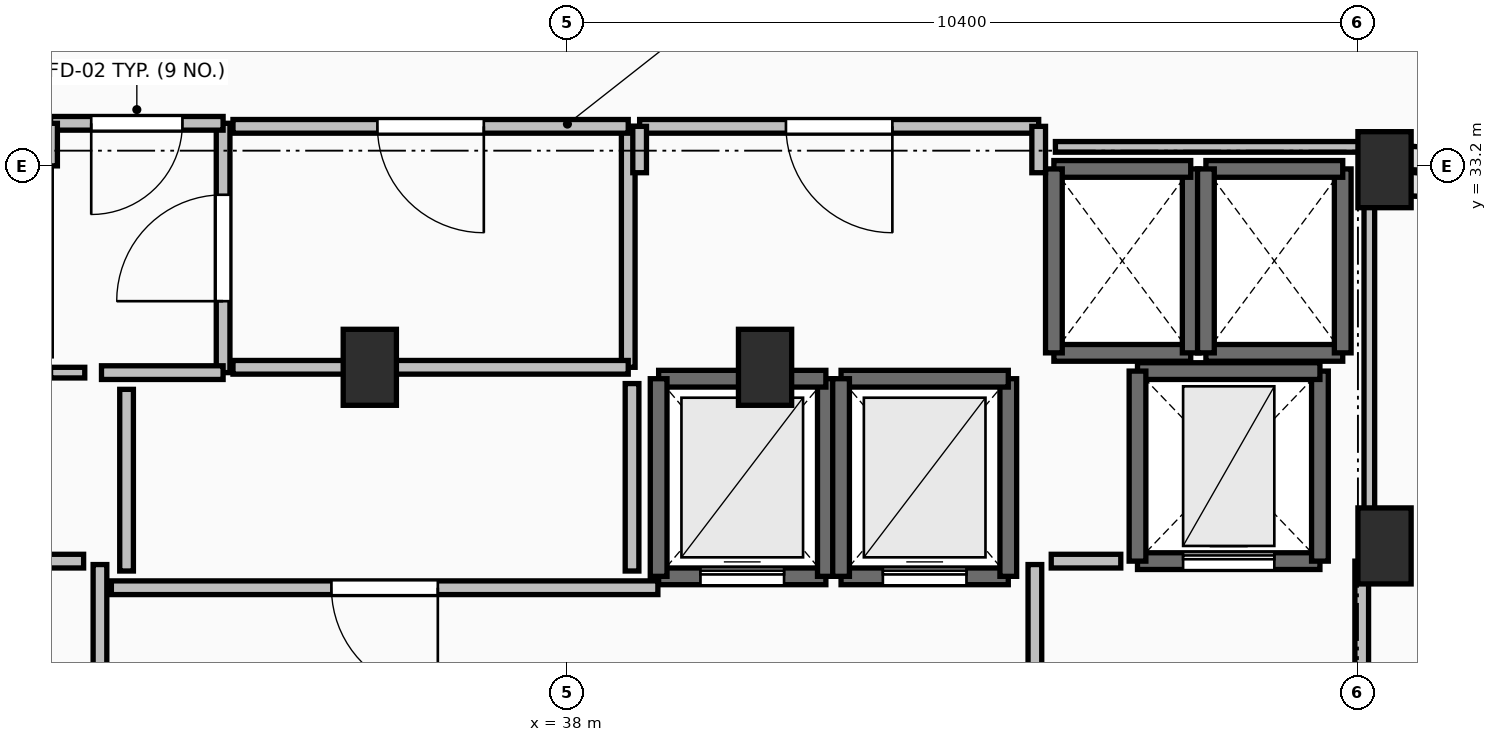
"""IFC4 building model, lengths in metres.
Left out: names, types, materials, properties, quantities, classifications, styles, units other than length and angle.
Written with IfcOpenShell. Run it as: python <this file> out.ifc"""

import sys

from ifc_helpers import new_model, si_unit, direction, frame, frame_2d, origin, origin_2d, place, context, subcontext, project, spatial, rectangle, extrude, element, fill, save


model = new_model("IFC4")
c1 = context("Model", 3, precision=1e-05, world=origin(), true_north=direction((0.0, 1.0)))
c2 = subcontext(c1, "Body", "Model", "MODEL_VIEW")
j1 = project(units=[si_unit("LENGTHUNIT", "METRE"), si_unit("PLANEANGLEUNIT", "RADIAN")], contexts=[c1])
p1 = place(None, origin())
s1 = spatial("IfcSite", under=j1, at=p1, CompositionType="ELEMENT")
p2 = place(p1, origin())
s2 = spatial("IfcBuilding", under=s1, at=p2, CompositionType="ELEMENT")
p3 = place(p2, frame((0.0, 0.0, 224.95)))
s3 = spatial("IfcBuildingStorey", under=s2, at=p3, CompositionType="ELEMENT", Elevation=224.95)
for number, where, z_axis, x_axis in (
    (1, (48.75, 33.15, 0.0), (0.0, 0.0, 1.0), (1.0, 0.0, 0.0)),
    (2, (48.75, 28.2, 0.0), (0.0, 0.0, 1.0), (1.0, 0.0, 0.0)),
    (3, (35.4, 30.55, 0.0), (0.0, 0.0, 1.0), (1.0, 0.0, 0.0)),
    (4, (40.6, 30.55, 0.0), (0.0, 0.0, 1.0), (1.0, 0.0, 0.0)),
):
    element("IfcColumn", number, at=place(p3, frame(where, z_axis=z_axis, x_axis=x_axis)), inside=s3, PredefinedType="PILASTER", context=c2, shape_type="SweptSolid", body=[
        extrude(rectangle(XDim=0.7, YDim=1.0, at=origin_2d()), origin(), (0.0, 0.0, 1.0), 4.8),
    ])
p4 = place(p3, frame((39.2, 27.8, 0.0), z_axis=(0.0, 0.0, 1.0), x_axis=(1.0, 0.0, 0.0)))
e5 = element("IfcWall", 5, at=p4, inside=s3, PredefinedType="SOLIDWALL", context=c2, shape_type="SweptSolid", body=[
    extrude(rectangle(XDim=2.2, YDim=0.22, at=frame_2d((1.1, 0.0))), origin(), (0.0, 0.0, 1.0), 4.5),
])
p5 = place(p4, frame((0.55, 0.0, 0.0)))
e6 = element("IfcOpeningElement", 6, at=p5, cuts=e5, PredefinedType="OPENING", context=c2, shape_type="SweptSolid", body=[
    extrude(rectangle(XDim=1.1, YDim=2.2, at=frame_2d((0.55, 1.1))), frame((0.0, 0.125, 0.0), z_axis=(0.0, -1.0, 0.0), x_axis=(1.0, 0.0, 0.0)), (0.0, 0.0, 1.0), 0.25),
])
p6 = place(p3, frame((41.4, 27.8, 0.0), z_axis=(0.0, 0.0, 1.0), x_axis=(0.0, 1.0, 0.0)))
e7 = element("IfcWall", 7, at=p6, inside=s3, PredefinedType="SOLIDWALL", context=c2, shape_type="SweptSolid", body=[
    extrude(rectangle(XDim=2.6, YDim=0.22, at=frame_2d((1.3, 0.0))), origin(), (0.0, 0.0, 1.0), 4.5),
])
p7 = place(p3, frame((41.4, 30.4, 0.0), z_axis=(0.0, 0.0, 1.0), x_axis=(-1.0, 0.0, 0.0)))
e8 = element("IfcWall", 8, at=p7, inside=s3, PredefinedType="SOLIDWALL", context=c2, shape_type="SweptSolid", body=[
    extrude(rectangle(XDim=2.2, YDim=0.22, at=frame_2d((1.1, 0.0))), origin(), (0.0, 0.0, 1.0), 4.5),
])
p8 = place(p3, frame((39.2, 30.4, 0.0), z_axis=(0.0, 0.0, 1.0), x_axis=(0.0, -1.0, 0.0)))
e9 = element("IfcWall", 9, at=p8, inside=s3, PredefinedType="SOLIDWALL", context=c2, shape_type="SweptSolid", body=[
    extrude(rectangle(XDim=2.6, YDim=0.22, at=frame_2d((1.3, 0.0))), origin(), (0.0, 0.0, 1.0), 4.5),
])
p9 = place(p3, frame((41.6, 27.8, 0.0), z_axis=(0.0, 0.0, 1.0), x_axis=(1.0, 0.0, 0.0)))
e10 = element("IfcWall", 10, at=p9, inside=s3, PredefinedType="SOLIDWALL", context=c2, shape_type="SweptSolid", body=[
    extrude(rectangle(XDim=2.2, YDim=0.22, at=frame_2d((1.1, 0.0))), origin(), (0.0, 0.0, 1.0), 4.5),
])
p10 = place(p9, frame((0.55, 0.0, 0.0)))
e11 = element("IfcOpeningElement", 11, at=p10, cuts=e10, PredefinedType="OPENING", context=c2, shape_type="SweptSolid", body=[
    extrude(rectangle(XDim=1.1, YDim=2.2, at=frame_2d((0.55, 1.1))), frame((0.0, 0.125, 0.0), z_axis=(0.0, -1.0, 0.0), x_axis=(1.0, 0.0, 0.0)), (0.0, 0.0, 1.0), 0.25),
])
p11 = place(p3, frame((43.8, 27.8, 0.0), z_axis=(0.0, 0.0, 1.0), x_axis=(0.0, 1.0, 0.0)))
e12 = element("IfcWall", 12, at=p11, inside=s3, PredefinedType="SOLIDWALL", context=c2, shape_type="SweptSolid", body=[
    extrude(rectangle(XDim=2.6, YDim=0.22, at=frame_2d((1.3, 0.0))), origin(), (0.0, 0.0, 1.0), 4.5),
])
p12 = place(p3, frame((43.8, 30.4, 0.0), z_axis=(0.0, 0.0, 1.0), x_axis=(-1.0, 0.0, 0.0)))
e13 = element("IfcWall", 13, at=p12, inside=s3, PredefinedType="SOLIDWALL", context=c2, shape_type="SweptSolid", body=[
    extrude(rectangle(XDim=2.2, YDim=0.22, at=frame_2d((1.1, 0.0))), origin(), (0.0, 0.0, 1.0), 4.5),
])
p13 = place(p3, frame((41.6, 30.4, 0.0), z_axis=(0.0, 0.0, 1.0), x_axis=(0.0, -1.0, 0.0)))
e14 = element("IfcWall", 14, at=p13, inside=s3, PredefinedType="SOLIDWALL", context=c2, shape_type="SweptSolid", body=[
    extrude(rectangle(XDim=2.6, YDim=0.22, at=frame_2d((1.3, 0.0))), origin(), (0.0, 0.0, 1.0), 4.5),
])
p14 = place(p3, frame((44.4, 30.74, 0.0), z_axis=(0.0, 0.0, 1.0), x_axis=(1.0, 0.0, 0.0)))
e15 = element("IfcWall", 15, at=p14, inside=s3, PredefinedType="SOLIDWALL", context=c2, shape_type="SweptSolid", body=[
    extrude(rectangle(XDim=1.8, YDim=0.22, at=frame_2d((0.9, 0.0))), origin(), (0.0, 0.0, 1.0), 4.5),
])
p15 = place(p3, frame((46.2, 30.74, 0.0), z_axis=(0.0, 0.0, 1.0), x_axis=(0.0, 1.0, 0.0)))
e16 = element("IfcWall", 16, at=p15, inside=s3, PredefinedType="SOLIDWALL", context=c2, shape_type="SweptSolid", body=[
    extrude(rectangle(XDim=2.42, YDim=0.22, at=frame_2d((1.21, 0.0))), origin(), (0.0, 0.0, 1.0), 4.5),
])
p16 = place(p3, frame((46.2, 33.16, 0.0), z_axis=(0.0, 0.0, 1.0), x_axis=(-1.0, 0.0, 0.0)))
e17 = element("IfcWall", 17, at=p16, inside=s3, PredefinedType="SOLIDWALL", context=c2, shape_type="SweptSolid", body=[
    extrude(rectangle(XDim=1.8, YDim=0.22, at=frame_2d((0.9, 0.0))), origin(), (0.0, 0.0, 1.0), 4.5),
])
p17 = place(p3, frame((44.4, 33.16, 0.0), z_axis=(0.0, 0.0, 1.0), x_axis=(0.0, -1.0, 0.0)))
e18 = element("IfcWall", 18, at=p17, inside=s3, PredefinedType="SOLIDWALL", context=c2, shape_type="SweptSolid", body=[
    extrude(rectangle(XDim=2.42, YDim=0.22, at=frame_2d((1.21, 0.0))), origin(), (0.0, 0.0, 1.0), 4.5),
])
p18 = place(p3, frame((46.4, 30.74, 0.0), z_axis=(0.0, 0.0, 1.0), x_axis=(1.0, 0.0, 0.0)))
e19 = element("IfcWall", 19, at=p18, inside=s3, PredefinedType="SOLIDWALL", context=c2, shape_type="SweptSolid", body=[
    extrude(rectangle(XDim=1.8, YDim=0.22, at=frame_2d((0.9, 0.0))), origin(), (0.0, 0.0, 1.0), 4.5),
])
p19 = place(p3, frame((48.2, 30.74, 0.0), z_axis=(0.0, 0.0, 1.0), x_axis=(0.0, 1.0, 0.0)))
e20 = element("IfcWall", 20, at=p19, inside=s3, PredefinedType="SOLIDWALL", context=c2, shape_type="SweptSolid", body=[
    extrude(rectangle(XDim=2.42, YDim=0.22, at=frame_2d((1.21, 0.0))), origin(), (0.0, 0.0, 1.0), 4.5),
])
p20 = place(p3, frame((48.2, 33.16, 0.0), z_axis=(0.0, 0.0, 1.0), x_axis=(-1.0, 0.0, 0.0)))
e21 = element("IfcWall", 21, at=p20, inside=s3, PredefinedType="SOLIDWALL", context=c2, shape_type="SweptSolid", body=[
    extrude(rectangle(XDim=1.8, YDim=0.22, at=frame_2d((0.9, 0.0))), origin(), (0.0, 0.0, 1.0), 4.5),
])
p21 = place(p3, frame((46.4, 33.16, 0.0), z_axis=(0.0, 0.0, 1.0), x_axis=(0.0, -1.0, 0.0)))
e22 = element("IfcWall", 22, at=p21, inside=s3, PredefinedType="SOLIDWALL", context=c2, shape_type="SweptSolid", body=[
    extrude(rectangle(XDim=2.42, YDim=0.22, at=frame_2d((1.21, 0.0))), origin(), (0.0, 0.0, 1.0), 4.5),
])
p22 = place(p3, frame((45.5, 28.0, 0.0), z_axis=(0.0, 0.0, 1.0), x_axis=(1.0, 0.0, 0.0)))
e23 = element("IfcWall", 23, at=p22, inside=s3, PredefinedType="SHEAR", context=c2, shape_type="SweptSolid", body=[
    extrude(rectangle(XDim=2.4, YDim=0.22, at=frame_2d((1.2, 0.0))), origin(), (0.0, 0.0, 1.0), 4.5),
])
p23 = place(p22, frame((0.6, 0.0, 0.0)))
e24 = element("IfcOpeningElement", 24, at=p23, cuts=e23, PredefinedType="OPENING", context=c2, shape_type="SweptSolid", body=[
    extrude(rectangle(XDim=1.2, YDim=2.2, at=frame_2d((0.6, 1.1))), frame((0.0, 0.125, 0.0), z_axis=(0.0, -1.0, 0.0), x_axis=(1.0, 0.0, 0.0)), (0.0, 0.0, 1.0), 0.25),
])
p24 = place(p3, frame((47.9, 28.0, 0.0), z_axis=(0.0, 0.0, 1.0), x_axis=(0.0, 1.0, 0.0)))
e25 = element("IfcWall", 25, at=p24, inside=s3, PredefinedType="SHEAR", context=c2, shape_type="SweptSolid", body=[
    extrude(rectangle(XDim=2.5, YDim=0.22, at=frame_2d((1.25, 0.0))), origin(), (0.0, 0.0, 1.0), 4.5),
])
p25 = place(p3, frame((47.9, 30.5, 0.0), z_axis=(0.0, 0.0, 1.0), x_axis=(-1.0, 0.0, 0.0)))
e26 = element("IfcWall", 26, at=p25, inside=s3, PredefinedType="SHEAR", context=c2, shape_type="SweptSolid", body=[
    extrude(rectangle(XDim=2.4, YDim=0.22, at=frame_2d((1.2, 0.0))), origin(), (0.0, 0.0, 1.0), 4.5),
])
p26 = place(p3, frame((45.5, 30.5, 0.0), z_axis=(0.0, 0.0, 1.0), x_axis=(0.0, -1.0, 0.0)))
e27 = element("IfcWall", 27, at=p26, inside=s3, PredefinedType="SHEAR", context=c2, shape_type="SweptSolid", body=[
    extrude(rectangle(XDim=2.5, YDim=0.22, at=frame_2d((1.25, 0.0))), origin(), (0.0, 0.0, 1.0), 4.5),
])
p27 = place(p3, frame((31.85, 24.045, 0.0), z_axis=(0.0, 0.0, 1.0), x_axis=(0.0, 1.0, 0.0)))
e28 = element("IfcWall", 28, at=p27, inside=s3, PredefinedType="PARTITIONING", context=c2, shape_type="SweptSolid", body=[
    extrude(rectangle(XDim=3.91, YDim=0.18, at=frame_2d((1.955, 0.0))), origin(), (0.0, 0.0, 1.0), 4.5),
])
p28 = place(p27, frame((1.355, 0.0, 0.0)))
e29 = element("IfcOpeningElement", 29, at=p28, cuts=e28, PredefinedType="OPENING", context=c2, shape_type="SweptSolid", body=[
    extrude(rectangle(XDim=1.2, YDim=2.15, at=frame_2d((0.6, 1.075))), frame((0.0, 0.105, 0.0), z_axis=(0.0, -1.0, 0.0), x_axis=(1.0, 0.0, 0.0)), (0.0, 0.0, 1.0), 0.21),
])
p29 = place(p3, frame((44.15, 27.955, 0.0), z_axis=(0.0, 0.0, 1.0), x_axis=(0.0, -1.0, 0.0)))
e30 = element("IfcWall", 30, at=p29, inside=s3, PredefinedType="PARTITIONING", context=c2, shape_type="SweptSolid", body=[
    extrude(rectangle(XDim=3.91, YDim=0.18, at=frame_2d((1.955, 0.0))), origin(), (0.0, 0.0, 1.0), 4.5),
])
p30 = place(p29, frame((1.355, 0.0, 0.0)))
e31 = element("IfcOpeningElement", 31, at=p30, cuts=e30, PredefinedType="OPENING", context=c2, shape_type="SweptSolid", body=[
    extrude(rectangle(XDim=1.2, YDim=2.15, at=frame_2d((0.6, 1.075))), frame((0.0, 0.105, 0.0), z_axis=(0.0, -1.0, 0.0), x_axis=(1.0, 0.0, 0.0)), (0.0, 0.0, 1.0), 0.21),
])
p31 = place(p3, frame((48.45, 23.95, 0.0), z_axis=(0.0, 0.0, 1.0), x_axis=(0.0, 1.0, 0.0)))
e32 = element("IfcWall", 32, at=p31, inside=s3, PredefinedType="PARTITIONING", context=c2, shape_type="SweptSolid", body=[
    extrude(rectangle(XDim=4.05, YDim=0.18, at=frame_2d((2.025, 0.0))), origin(), (0.0, 0.0, 1.0), 3.482),
])
p32 = place(p31, frame((1.425, 0.0, 0.0)))
e33 = element("IfcOpeningElement", 33, at=p32, cuts=e32, PredefinedType="OPENING", context=c2, shape_type="SweptSolid", body=[
    extrude(rectangle(XDim=1.2, YDim=2.15, at=frame_2d((0.6, 1.075))), frame((0.0, 0.105, 0.0), z_axis=(0.0, -1.0, 0.0), x_axis=(1.0, 0.0, 0.0)), (0.0, 0.0, 1.0), 0.21),
])
p33 = place(p3, frame((33.47, 30.48, 0.0), z_axis=(0.0, 0.0, 1.0), x_axis=(0.0, 1.0, 0.0)))
e34 = element("IfcWall", 34, at=p33, inside=s3, PredefinedType="PARTITIONING", context=c2, shape_type="SweptSolid", body=[
    extrude(rectangle(XDim=3.28, YDim=0.18, at=frame_2d((1.64, 0.0))), origin(), (0.0, 0.0, 1.0), 4.5),
])
p34 = place(p33, frame((0.94, 0.0, 0.0)))
e35 = element("IfcOpeningElement", 35, at=p34, cuts=e34, PredefinedType="OPENING", context=c2, shape_type="SweptSolid", body=[
    extrude(rectangle(XDim=1.4, YDim=2.2, at=frame_2d((0.7, 1.1))), frame((0.0, 0.105, 0.0), z_axis=(0.0, -1.0, 0.0), x_axis=(1.0, 0.0, 0.0)), (0.0, 0.0, 1.0), 0.21),
])
p35 = place(p3, frame((31.87, 30.48, 0.0), z_axis=(0.0, 0.0, 1.0), x_axis=(1.0, 0.0, 0.0)))
e36 = element("IfcWall", 36, at=p35, inside=s3, PredefinedType="PARTITIONING", context=c2, shape_type="SweptSolid", body=[
    extrude(rectangle(XDim=1.6, YDim=0.18, at=frame_2d((0.8, 0.0))), origin(), (0.0, 0.0, 1.0), 4.5),
])
p36 = place(p3, frame((33.47, 33.76, 0.0), z_axis=(0.0, 0.0, 1.0), x_axis=(-1.0, 0.0, 0.0)))
e37 = element("IfcWall", 37, at=p36, inside=s3, PredefinedType="PARTITIONING", context=c2, shape_type="SweptSolid", body=[
    extrude(rectangle(XDim=2.27, YDim=0.18, at=frame_2d((1.135, 0.0))), origin(), (0.0, 0.0, 1.0), 4.5),
])
p37 = place(p36, frame((0.535, 0.0, 0.0)))
e38 = element("IfcOpeningElement", 38, at=p37, cuts=e37, PredefinedType="OPENING", context=c2, shape_type="SweptSolid", body=[
    extrude(rectangle(XDim=1.2, YDim=2.15, at=frame_2d((0.6, 1.075))), frame((0.0, 0.105, 0.0), z_axis=(0.0, -1.0, 0.0), x_axis=(1.0, 0.0, 0.0)), (0.0, 0.0, 1.0), 0.21),
])
p38 = place(p3, frame((31.2, 33.76, 0.0), z_axis=(0.0, 0.0, 1.0), x_axis=(0.0, -1.0, 0.0)))
e39 = element("IfcWall", 39, at=p38, inside=s3, PredefinedType="PARTITIONING", context=c2, shape_type="SweptSolid", body=[
    extrude(rectangle(XDim=0.56, YDim=0.18, at=frame_2d((0.28, 0.0))), origin(), (0.0, 0.0, 1.0), 4.5),
])
p39 = place(p3, frame((39.19, 27.65, 0.0), z_axis=(0.0, 0.0, 1.0), x_axis=(-1.0, 0.0, 0.0)))
e40 = element("IfcWall", 40, at=p39, inside=s3, PredefinedType="PARTITIONING", context=c2, shape_type="SweptSolid", body=[
    extrude(rectangle(XDim=7.19, YDim=0.18, at=frame_2d((3.595, 0.0))), origin(), (0.0, 0.0, 1.0), 4.5),
])
p40 = place(p39, frame((2.895, 0.0, 0.0)))
e41 = element("IfcOpeningElement", 41, at=p40, cuts=e40, PredefinedType="OPENING", context=c2, shape_type="SweptSolid", body=[
    extrude(rectangle(XDim=1.4, YDim=2.2, at=frame_2d((0.7, 1.1))), frame((0.0, 0.105, 0.0), z_axis=(0.0, -1.0, 0.0), x_axis=(1.0, 0.0, 0.0)), (0.0, 0.0, 1.0), 0.21),
])
p41 = place(p3, frame((38.8, 30.55, 0.0), z_axis=(0.0, 0.0, 1.0), x_axis=(0.0, 1.0, 0.0)))
e42 = element("IfcWall", 42, at=p41, inside=s3, PredefinedType="PARTITIONING", context=c2, shape_type="SweptSolid", body=[
    extrude(rectangle(XDim=3.17, YDim=0.18, at=frame_2d((1.585, 0.0))), origin(), (0.0, 0.0, 1.0), 3.482),
])
p42 = place(p3, frame((33.6, 30.55, 0.0), z_axis=(0.0, 0.0, 1.0), x_axis=(1.0, 0.0, 0.0)))
e43 = element("IfcWall", 43, at=p42, inside=s3, PredefinedType="PARTITIONING", context=c2, shape_type="SweptSolid", body=[
    extrude(rectangle(XDim=5.2, YDim=0.18, at=frame_2d((2.6, 0.0))), origin(), (0.0, 0.0, 1.0), 3.482),
])
p43 = place(p3, frame((38.8, 33.72, 0.0), z_axis=(0.0, 0.0, 1.0), x_axis=(-1.0, 0.0, 0.0)))
e44 = element("IfcWall", 44, at=p43, inside=s3, PredefinedType="PARTITIONING", context=c2, shape_type="SweptSolid", body=[
    extrude(rectangle(XDim=5.2, YDim=0.18, at=frame_2d((2.6, 0.0))), origin(), (0.0, 0.0, 1.0), 4.5),
])
p44 = place(p43, frame((1.9, 0.0, 0.0)))
e45 = element("IfcOpeningElement", 45, at=p44, cuts=e44, PredefinedType="OPENING", context=c2, shape_type="SweptSolid", body=[
    extrude(rectangle(XDim=1.4, YDim=2.2, at=frame_2d((0.7, 1.1))), frame((0.0, 0.105, 0.0), z_axis=(0.0, -1.0, 0.0), x_axis=(1.0, 0.0, 0.0)), (0.0, 0.0, 1.0), 0.21),
])
p45 = place(p3, frame((44.2, 33.72, 0.0), z_axis=(0.0, 0.0, 1.0), x_axis=(-1.0, 0.0, 0.0)))
e46 = element("IfcWall", 46, at=p45, inside=s3, PredefinedType="PARTITIONING", context=c2, shape_type="SweptSolid", body=[
    extrude(rectangle(XDim=5.25, YDim=0.18, at=frame_2d((2.625, 0.0))), origin(), (0.0, 0.0, 1.0), 4.5),
])
p46 = place(p45, frame((1.925, 0.0, 0.0)))
e47 = element("IfcOpeningElement", 47, at=p46, cuts=e46, PredefinedType="OPENING", context=c2, shape_type="SweptSolid", body=[
    extrude(rectangle(XDim=1.4, YDim=2.2, at=frame_2d((0.7, 1.1))), frame((0.0, 0.105, 0.0), z_axis=(0.0, -1.0, 0.0), x_axis=(1.0, 0.0, 0.0)), (0.0, 0.0, 1.0), 0.21),
])
for number, where, z_axis, x_axis in (
    (48, (38.95, 33.72, 0.0), (0.0, 0.0, 1.0), (0.0, -1.0, 0.0)),
    (49, (44.2, 33.11, 0.0), (0.0, 0.0, 1.0), (0.0, 1.0, 0.0)),
):
    element("IfcWall", number, at=place(p3, frame(where, z_axis=z_axis, x_axis=x_axis)), inside=s3, PredefinedType="PARTITIONING", context=c2, shape_type="SweptSolid", body=[
        extrude(rectangle(XDim=0.61, YDim=0.18, at=frame_2d((0.305, 0.0))), origin(), (0.0, 0.0, 1.0), 4.5),
    ])
for number, where, z_axis, x_axis in (
    (50, (31.635, 28.0, 0.0), (0.0, 0.0, 1.0), (-1.0, 0.0, 0.0)),
    (51, (45.28, 28.0, 0.0), (0.0, 0.0, 1.0), (-1.0, 0.0, 0.0)),
):
    element("IfcWall", number, at=place(p3, frame(where, z_axis=z_axis, x_axis=x_axis)), inside=s3, PredefinedType="PARTITIONING", context=c2, shape_type="SweptSolid", body=[
        extrude(rectangle(XDim=0.915, YDim=0.18, at=frame_2d((0.458, 0.0))), origin(), (0.0, 0.0, 1.0), 4.5),
    ])
p47 = place(p3, frame((31.2, 30.48, 0.0), z_axis=(0.0, 0.0, 1.0), x_axis=(1.0, 0.0, 0.0)))
e52 = element("IfcWall", 52, at=p47, inside=s3, PredefinedType="PARTITIONING", context=c2, shape_type="SweptSolid", body=[
    extrude(rectangle(XDim=0.45, YDim=0.14, at=frame_2d((0.225, 0.0))), origin(), (0.0, 0.0, 1.0), 4.5),
])
p48 = place(p3, frame((32.2, 30.26, 0.0), z_axis=(0.0, 0.0, 1.0), x_axis=(0.0, -1.0, 0.0)))
e53 = element("IfcWall", 53, at=p48, inside=s3, PredefinedType="PARTITIONING", context=c2, shape_type="SweptSolid", body=[
    extrude(rectangle(XDim=2.39, YDim=0.18, at=frame_2d((1.195, 0.0))), origin(), (0.0, 0.0, 1.0), 4.5),
])
p49 = place(p3, frame((38.85, 27.87, 0.0), z_axis=(0.0, 0.0, 1.0), x_axis=(0.0, 1.0, 0.0)))
e54 = element("IfcWall", 54, at=p49, inside=s3, PredefinedType="PARTITIONING", context=c2, shape_type="SweptSolid", body=[
    extrude(rectangle(XDim=2.466, YDim=0.18, at=frame_2d((1.233, 0.0))), origin(), (0.0, 0.0, 1.0), 3.482),
])
p50 = place(p3, frame((48.55, 28.196, 0.0), z_axis=(0.0, 0.0, 1.0), x_axis=(0.0, 1.0, 0.0)))
e55 = element("IfcWall", 55, at=p50, inside=s3, PredefinedType="PARTITIONING", context=c2, shape_type="SweptSolid", body=[
    extrude(rectangle(XDim=5.254, YDim=0.14, at=frame_2d((2.627, 0.0))), origin(), (0.0, 0.0, 1.0), 3.482),
])
p51 = place(p3, frame((48.55, 33.45, 0.0), z_axis=(0.0, 0.0, 1.0), x_axis=(-1.0, 0.0, 0.0)))
e56 = element("IfcWall", 56, at=p51, inside=s3, PredefinedType="PARTITIONING", context=c2, shape_type="SweptSolid", body=[
    extrude(rectangle(XDim=4.13, YDim=0.14, at=frame_2d((2.065, 0.0))), origin(), (0.0, 0.0, 1.0), 3.482),
])
p52 = place(p5, origin())
e57 = element("IfcDoor", 57, at=p52, inside=s3, OperationType="SLIDING_TO_LEFT", PredefinedType="DOOR", context=c2, shape_type="SweptSolid", body=[
    extrude(rectangle(XDim=1.1, YDim=2.2, at=frame_2d((0.55, 1.1))), frame((0.0, 0.025, 0.0), z_axis=(0.0, -1.0, 0.0), x_axis=(1.0, 0.0, 0.0)), (0.0, 0.0, 1.0), 0.05),
])
fill(e6, e57)
p53 = place(p10, origin())
e58 = element("IfcDoor", 58, at=p53, inside=s3, OperationType="SLIDING_TO_LEFT", PredefinedType="DOOR", context=c2, shape_type="SweptSolid", body=[
    extrude(rectangle(XDim=1.1, YDim=2.2, at=frame_2d((0.55, 1.1))), frame((0.0, 0.025, 0.0), z_axis=(0.0, -1.0, 0.0), x_axis=(1.0, 0.0, 0.0)), (0.0, 0.0, 1.0), 0.05),
])
fill(e11, e58)
p54 = place(p23, origin())
e59 = element("IfcDoor", 59, at=p54, inside=s3, OperationType="SLIDING_TO_LEFT", PredefinedType="DOOR", context=c2, shape_type="SweptSolid", body=[
    extrude(rectangle(XDim=1.2, YDim=2.2, at=frame_2d((0.6, 1.1))), frame((0.0, 0.025, 0.0), z_axis=(0.0, -1.0, 0.0), x_axis=(1.0, 0.0, 0.0)), (0.0, 0.0, 1.0), 0.05),
])
fill(e24, e59)
p55 = place(p34, origin())
e60 = element("IfcDoor", 60, at=p55, inside=s3, OperationType="DOUBLE_SWING_LEFT", PredefinedType="DOOR", context=c2, shape_type="SweptSolid", body=[
    extrude(rectangle(XDim=1.4, YDim=2.2, at=frame_2d((0.7, 1.1))), frame((0.0, 0.025, 0.0), z_axis=(0.0, -1.0, 0.0), x_axis=(1.0, 0.0, 0.0)), (0.0, 0.0, 1.0), 0.05),
])
fill(e35, e60)
p56 = place(p37, origin())
e61 = element("IfcDoor", 61, at=p56, inside=s3, OperationType="SINGLE_SWING_RIGHT", PredefinedType="DOOR", context=c2, shape_type="SweptSolid", body=[
    extrude(rectangle(XDim=1.2, YDim=2.15, at=frame_2d((0.6, 1.075))), frame((0.0, 0.025, 0.0), z_axis=(0.0, -1.0, 0.0), x_axis=(1.0, 0.0, 0.0)), (0.0, 0.0, 1.0), 0.05),
])
fill(e38, e61)
p57 = place(p40, origin())
e62 = element("IfcDoor", 62, at=p57, inside=s3, OperationType="DOUBLE_SWING_LEFT", PredefinedType="DOOR", context=c2, shape_type="SweptSolid", body=[
    extrude(rectangle(XDim=1.4, YDim=2.2, at=frame_2d((0.7, 1.1))), frame((0.0, 0.025, 0.0), z_axis=(0.0, -1.0, 0.0), x_axis=(1.0, 0.0, 0.0)), (0.0, 0.0, 1.0), 0.05),
])
fill(e41, e62)
p58 = place(p44, origin())
e63 = element("IfcDoor", 63, at=p58, inside=s3, OperationType="DOUBLE_SWING_LEFT", PredefinedType="DOOR", context=c2, shape_type="SweptSolid", body=[
    extrude(rectangle(XDim=1.4, YDim=2.2, at=frame_2d((0.7, 1.1))), frame((0.0, 0.025, 0.0), z_axis=(0.0, -1.0, 0.0), x_axis=(1.0, 0.0, 0.0)), (0.0, 0.0, 1.0), 0.05),
])
fill(e45, e63)
p59 = place(p46, origin())
e64 = element("IfcDoor", 64, at=p59, inside=s3, OperationType="DOUBLE_SWING_LEFT", PredefinedType="DOOR", context=c2, shape_type="SweptSolid", body=[
    extrude(rectangle(XDim=1.4, YDim=2.2, at=frame_2d((0.7, 1.1))), frame((0.0, 0.025, 0.0), z_axis=(0.0, -1.0, 0.0), x_axis=(1.0, 0.0, 0.0)), (0.0, 0.0, 1.0), 0.05),
])
fill(e47, e64)
save(model, sys.argv[1])
